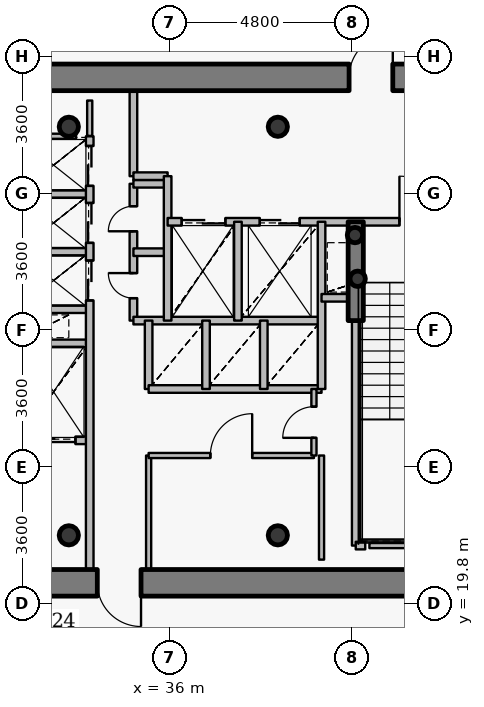
"""IFC4 building model, lengths in metres.
Left out: names, types, materials, properties, quantities, classifications, styles, units other than length and angle.
Written with IfcOpenShell. Run it as: python <this file> out.ifc"""

import sys

from ifc_helpers import new_model, si_unit, direction, frame, frame_2d, origin, origin_2d, place, context, subcontext, project, spatial, rectangle, hollow_circle, extrude, source, transform, mapped, element, fill, save


model = new_model("IFC4")
c1 = context("Model", 3, precision=1e-05, world=origin(), true_north=direction((0.0, 1.0)))
c2 = subcontext(c1, "Body", "Model", "MODEL_VIEW")
j1 = project(units=[si_unit("LENGTHUNIT", "METRE"), si_unit("PLANEANGLEUNIT", "RADIAN")], contexts=[c1])
p1 = place(None, origin())
s1 = spatial("IfcSite", under=j1, at=p1, CompositionType="ELEMENT")
p2 = place(p1, origin())
s2 = spatial("IfcBuilding", under=s1, at=p2, CompositionType="ELEMENT")
p3 = place(p2, frame((0.0, 0.0, 240.3)))
s3 = spatial("IfcBuildingStorey", under=s2, at=p3, CompositionType="ELEMENT", Elevation=240.3)
for number, where, z_axis, x_axis in (
    (1, (33.35, 21.6, 0.0), (0.0, 0.0, 1.0), (1.0, 0.0, 0.0)),
    (2, (38.85, 21.6, 0.0), (0.0, 0.0, 1.0), (1.0, 0.0, 0.0)),
    (3, (38.85, 32.35, 0.0), (0.0, 0.0, 1.0), (1.0, 0.0, 0.0)),
    (4, (33.35, 32.35, 0.0), (0.0, 0.0, 1.0), (1.0, 0.0, 0.0)),
):
    element("IfcColumn", number, at=place(p3, frame(where, z_axis=z_axis, x_axis=x_axis)), inside=s3, PredefinedType="COLUMN", context=c2, shape_type="SweptSolid", body=[
        extrude(hollow_circle(Radius=0.254, WallThickness=0.02, at=origin_2d()), origin(), (0.0, 0.0, 1.0), 3.75),
    ])
for number, where, z_axis, x_axis in (
    (5, (40.95, 28.35, 0.0), (0.0, 0.0, 1.0), (1.0, 0.0, 0.0)),
    (6, (40.88, 29.5, 0.0), (0.0, 0.0, 1.0), (1.0, 0.0, 0.0)),
):
    element("IfcColumn", number, at=place(p3, frame(where, z_axis=z_axis, x_axis=x_axis)), inside=s3, PredefinedType="COLUMN", context=c2, shape_type="SweptSolid", body=[
        extrude(hollow_circle(Radius=0.203, WallThickness=0.016, at=origin_2d()), origin(), (0.0, 0.0, 1.0), 3.75),
    ])
p4 = place(p3, frame((27.05, 33.65, 0.0), z_axis=(0.0, 0.0, 1.0), x_axis=(1.0, 0.0, 0.0)))
e7 = element("IfcWall", 7, at=p4, inside=s3, PredefinedType="SHEAR", context=c2, shape_type="SweptSolid", body=[
    extrude(rectangle(XDim=17.9, YDim=0.7, at=frame_2d((8.95, 0.0))), origin(), (0.0, 0.0, 1.0), 3.05),
])
p5 = place(p4, frame((13.675, 0.0, 0.0)))
e8 = element("IfcOpeningElement", 8, at=p5, cuts=e7, PredefinedType="OPENING", context=c2, shape_type="SweptSolid", body=[
    extrude(rectangle(XDim=1.15, YDim=2.15, at=origin_2d()), frame((0.575, 0.36, 1.075), z_axis=(0.0, -1.0, 0.0), x_axis=(1.0, 0.0, 0.0)), (0.0, 0.0, 1.0), 0.72),
])
p6 = place(p3, frame((44.95, 20.35, 0.0), z_axis=(0.0, 0.0, 1.0), x_axis=(-1.0, 0.0, 0.0)))
e9 = element("IfcWall", 9, at=p6, inside=s3, PredefinedType="SHEAR", context=c2, shape_type="SweptSolid", body=[
    extrude(rectangle(XDim=17.9, YDim=0.7, at=frame_2d((8.95, 0.0))), origin(), (0.0, 0.0, 1.0), 3.05),
])
p7 = place(p6, frame((9.7, 0.0, 0.0)))
e10 = element("IfcOpeningElement", 10, at=p7, cuts=e9, PredefinedType="OPENING", context=c2, shape_type="SweptSolid", body=[
    extrude(rectangle(XDim=1.15, YDim=2.15, at=origin_2d()), frame((0.575, 0.36, 1.075), z_axis=(0.0, -1.0, 0.0), x_axis=(1.0, 0.0, 0.0)), (0.0, 0.0, 1.0), 0.72),
])
p8 = place(p3, frame((40.9, 27.25, 0.0), z_axis=(0.0, 0.0, 1.0), x_axis=(0.0, 1.0, 0.0)))
e11 = element("IfcWall", 11, at=p8, inside=s3, PredefinedType="SHEAR", context=c2, shape_type="SweptSolid", body=[
    extrude(rectangle(XDim=2.6, YDim=0.4, at=frame_2d((1.3, 0.0))), origin(), (0.0, 0.0, 1.0), 3.1),
])
p9 = place(p3, frame((32.0, 24.1, 0.0), z_axis=(0.0, 0.0, 1.0), x_axis=(1.0, 0.0, 0.0)))
e12 = element("IfcWall", 12, at=p9, inside=s3, PredefinedType="PARTITIONING", context=c2, shape_type="SweptSolid", body=[
    extrude(rectangle(XDim=1.9, YDim=0.2, at=frame_2d((0.95, 0.0))), origin(), (0.0, 0.0, 1.0), 3.085),
])
p10 = place(p9, frame((0.375, 0.0, 0.0)))
e13 = element("IfcOpeningElement", 13, at=p10, cuts=e12, PredefinedType="OPENING", context=c2, shape_type="SweptSolid", body=[
    extrude(rectangle(XDim=1.15, YDim=2.15, at=origin_2d()), frame((0.575, 0.11, 1.075), z_axis=(0.0, -1.0, 0.0), x_axis=(1.0, 0.0, 0.0)), (0.0, 0.0, 1.0), 0.22),
])
for number, where, z_axis, x_axis in (
    (14, (32.0, 26.65, 0.0), (0.0, 0.0, 1.0), (1.0, 0.0, 0.0)),
    (15, (32.0, 27.55, 0.0), (0.0, 0.0, 1.0), (1.0, 0.0, 0.0)),
    (16, (32.0, 29.06, 0.0), (0.0, 0.0, 1.0), (1.0, 0.0, 0.0)),
    (17, (32.0, 30.58, 0.0), (0.0, 0.0, 1.0), (1.0, 0.0, 0.0)),
):
    element("IfcWall", number, at=place(p3, frame(where, z_axis=z_axis, x_axis=x_axis)), inside=s3, PredefinedType="PARTITIONING", context=c2, shape_type="SweptSolid", body=[
        extrude(rectangle(XDim=1.9, YDim=0.2, at=frame_2d((0.95, 0.0))), origin(), (0.0, 0.0, 1.0), 3.085),
    ])
p11 = place(p3, frame((33.9, 20.7, 0.0), z_axis=(0.0, 0.0, 1.0), x_axis=(0.0, 1.0, 0.0)))
e18 = element("IfcWall", 18, at=p11, inside=s3, PredefinedType="PARTITIONING", context=c2, shape_type="SweptSolid", body=[
    extrude(rectangle(XDim=11.4, YDim=0.2, at=frame_2d((5.7, 0.0))), origin(), (0.0, 0.0, 1.0), 3.085),
])
p12 = place(p11, frame((7.08, 0.0, 0.0)))
e19 = element("IfcOpeningElement", 19, at=p12, cuts=e18, PredefinedType="OPENING", context=c2, shape_type="SweptSolid", body=[
    extrude(rectangle(XDim=1.05, YDim=2.15, at=origin_2d()), frame((0.525, 0.11, 1.075), z_axis=(0.0, -1.0, 0.0), x_axis=(1.0, 0.0, 0.0)), (0.0, 0.0, 1.0), 0.22),
])
p13 = place(p11, frame((8.595, 0.0, 0.0)))
e20 = element("IfcOpeningElement", 20, at=p13, cuts=e18, PredefinedType="OPENING", context=c2, shape_type="SweptSolid", body=[
    extrude(rectangle(XDim=1.05, YDim=2.15, at=origin_2d()), frame((0.525, 0.11, 1.075), z_axis=(0.0, -1.0, 0.0), x_axis=(1.0, 0.0, 0.0)), (0.0, 0.0, 1.0), 0.22),
])
p14 = place(p11, frame((10.095, 0.0, 0.0)))
e21 = element("IfcOpeningElement", 21, at=p14, cuts=e18, PredefinedType="OPENING", context=c2, shape_type="SweptSolid", body=[
    extrude(rectangle(XDim=1.05, YDim=2.15, at=origin_2d()), frame((0.525, 0.11, 1.075), z_axis=(0.0, -1.0, 0.0), x_axis=(1.0, 0.0, 0.0)), (0.0, 0.0, 1.0), 0.22),
])
p15 = place(p3, frame((35.05, 27.25, 0.0), z_axis=(0.0, 0.0, 1.0), x_axis=(0.0, 1.0, 0.0)))
e22 = element("IfcWall", 22, at=p15, inside=s3, PredefinedType="PARTITIONING", context=c2, shape_type="SweptSolid", body=[
    extrude(rectangle(XDim=3.6, YDim=0.2, at=frame_2d((1.8, 0.0))), origin(), (0.0, 0.0, 1.0), 3.5),
])
p16 = place(p15, frame((0.59, 0.0, 0.0)))
e23 = element("IfcOpeningElement", 23, at=p16, cuts=e22, PredefinedType="OPENING", context=c2, shape_type="SweptSolid", body=[
    extrude(rectangle(XDim=0.66, YDim=2.05, at=origin_2d()), frame((0.33, 0.11, 1.025), z_axis=(0.0, -1.0, 0.0), x_axis=(1.0, 0.0, 0.0)), (0.0, 0.0, 1.0), 0.22),
])
p17 = place(p15, frame((2.35, 0.0, 0.0)))
e24 = element("IfcOpeningElement", 24, at=p17, cuts=e22, PredefinedType="OPENING", context=c2, shape_type="SweptSolid", body=[
    extrude(rectangle(XDim=0.66, YDim=2.05, at=origin_2d()), frame((0.33, 0.11, 1.025), z_axis=(0.0, -1.0, 0.0), x_axis=(1.0, 0.0, 0.0)), (0.0, 0.0, 1.0), 0.22),
])
p18 = place(p3, frame((35.05, 27.25, 0.0), z_axis=(0.0, 0.0, 1.0), x_axis=(1.0, 0.0, 0.0)))
e25 = element("IfcWall", 25, at=p18, inside=s3, PredefinedType="PARTITIONING", context=c2, shape_type="SweptSolid", body=[
    extrude(rectangle(XDim=4.95, YDim=0.2, at=frame_2d((2.475, 0.0))), origin(), (0.0, 0.0, 1.0), 3.085),
])
for number, where, z_axis, x_axis in (
    (26, (35.05, 29.05, 0.0), (0.0, 0.0, 1.0), (1.0, 0.0, 0.0)),
    (27, (35.05, 30.85, 0.0), (0.0, 0.0, 1.0), (1.0, 0.0, 0.0)),
):
    element("IfcWall", number, at=place(p3, frame(where, z_axis=z_axis, x_axis=x_axis)), inside=s3, PredefinedType="PARTITIONING", context=c2, shape_type="SweptSolid", body=[
        extrude(rectangle(XDim=0.9, YDim=0.2, at=frame_2d((0.45, 0.0))), origin(), (0.0, 0.0, 1.0), 3.5),
    ])
p19 = place(p3, frame((35.05, 31.05, 0.0), z_axis=(0.0, 0.0, 1.0), x_axis=(0.0, 1.0, 0.0)))
e28 = element("IfcWall", 28, at=p19, inside=s3, PredefinedType="PARTITIONING", context=c2, shape_type="SweptSolid", body=[
    extrude(rectangle(XDim=2.25, YDim=0.2, at=frame_2d((1.125, 0.0))), origin(), (0.0, 0.0, 1.0), 3.085),
])
p20 = place(p3, frame((35.05, 31.05, 0.0), z_axis=(0.0, 0.0, 1.0), x_axis=(1.0, 0.0, 0.0)))
e29 = element("IfcWall", 29, at=p20, inside=s3, PredefinedType="PARTITIONING", context=c2, shape_type="SweptSolid", body=[
    extrude(rectangle(XDim=0.9, YDim=0.2, at=frame_2d((0.45, 0.0))), origin(), (0.0, 0.0, 1.0), 3.5),
])
p21 = place(p3, frame((35.45, 20.7, 0.0), z_axis=(0.0, 0.0, 1.0), x_axis=(0.0, 1.0, 0.0)))
e30 = element("IfcWall", 30, at=p21, inside=s3, PredefinedType="PARTITIONING", context=c2, shape_type="SweptSolid", body=[
    extrude(rectangle(XDim=3.0, YDim=0.135, at=frame_2d((1.5, 0.0))), origin(), (0.0, 0.0, 1.0), 3.085),
])
p22 = place(p3, frame((35.45, 23.7, 0.0), z_axis=(0.0, 0.0, 1.0), x_axis=(1.0, 0.0, 0.0)))
e31 = element("IfcWall", 31, at=p22, inside=s3, PredefinedType="PARTITIONING", context=c2, shape_type="SweptSolid", body=[
    extrude(rectangle(XDim=4.35, YDim=0.135, at=frame_2d((2.175, 0.0))), origin(), (0.0, 0.0, 1.0), 3.085),
])
p23 = place(p22, frame((1.625, 0.0, 0.0)))
e32 = element("IfcOpeningElement", 32, at=p23, cuts=e31, PredefinedType="OPENING", context=c2, shape_type="SweptSolid", body=[
    extrude(rectangle(XDim=1.1, YDim=2.15, at=origin_2d()), frame((0.55, 0.078, 1.075), z_axis=(0.0, -1.0, 0.0), x_axis=(1.0, 0.0, 0.0)), (0.0, 0.0, 1.0), 0.155),
])
p24 = place(p3, frame((35.45, 25.45, 0.0), z_axis=(0.0, 0.0, 1.0), x_axis=(0.0, 1.0, 0.0)))
e33 = element("IfcWall", 33, at=p24, inside=s3, PredefinedType="PARTITIONING", context=c2, shape_type="SweptSolid", body=[
    extrude(rectangle(XDim=1.8, YDim=0.2, at=frame_2d((0.9, 0.0))), origin(), (0.0, 0.0, 1.0), 3.5),
])
p25 = place(p3, frame((35.45, 25.45, 0.0), z_axis=(0.0, 0.0, 1.0), x_axis=(1.0, 0.0, 0.0)))
e34 = element("IfcWall", 34, at=p25, inside=s3, PredefinedType="PARTITIONING", context=c2, shape_type="SweptSolid", body=[
    extrude(rectangle(XDim=4.55, YDim=0.2, at=frame_2d((2.275, 0.0))), origin(), (0.0, 0.0, 1.0), 3.085),
])
p26 = place(p3, frame((35.95, 27.25, 0.0), z_axis=(0.0, 0.0, 1.0), x_axis=(0.0, 1.0, 0.0)))
e35 = element("IfcWall", 35, at=p26, inside=s3, PredefinedType="PARTITIONING", context=c2, shape_type="SweptSolid", body=[
    extrude(rectangle(XDim=3.8, YDim=0.2, at=frame_2d((1.9, 0.0))), origin(), (0.0, 0.0, 1.0), 3.5),
])
p27 = place(p3, frame((35.95, 29.85, 0.0), z_axis=(0.0, 0.0, 1.0), x_axis=(1.0, 0.0, 0.0)))
e36 = element("IfcWall", 36, at=p27, inside=s3, PredefinedType="PARTITIONING", context=c2, shape_type="SweptSolid", body=[
    extrude(rectangle(XDim=8.49, YDim=0.2, at=frame_2d((4.245, 0.0))), origin(), (0.0, 0.0, 1.0), 3.085),
])
p28 = place(p27, frame((6.1, 0.0, 0.0)))
e37 = element("IfcOpeningElement", 37, at=p28, cuts=e36, PredefinedType="OPENING", context=c2, shape_type="SweptSolid", body=[
    extrude(rectangle(XDim=1.2, YDim=2.15, at=origin_2d()), frame((0.6, 0.11, 1.075), z_axis=(0.0, -1.0, 0.0), x_axis=(1.0, 0.0, 0.0)), (0.0, 0.0, 1.0), 0.22),
])
p29 = place(p27, frame((0.37, 0.0, 0.0)))
e38 = element("IfcOpeningElement", 38, at=p29, cuts=e36, PredefinedType="OPENING", context=c2, shape_type="SweptSolid", body=[
    extrude(rectangle(XDim=1.15, YDim=2.15, at=origin_2d()), frame((0.575, 0.11, 1.075), z_axis=(0.0, -1.0, 0.0), x_axis=(1.0, 0.0, 0.0)), (0.0, 0.0, 1.0), 0.22),
])
p30 = place(p27, frame((2.425, 0.0, 0.0)))
e39 = element("IfcOpeningElement", 39, at=p30, cuts=e36, PredefinedType="OPENING", context=c2, shape_type="SweptSolid", body=[
    extrude(rectangle(XDim=1.05, YDim=2.15, at=origin_2d()), frame((0.525, 0.11, 1.075), z_axis=(0.0, -1.0, 0.0), x_axis=(1.0, 0.0, 0.0)), (0.0, 0.0, 1.0), 0.22),
])
p31 = place(p3, frame((36.96, 25.45, 0.0), z_axis=(0.0, 0.0, 1.0), x_axis=(0.0, 1.0, 0.0)))
e40 = element("IfcWall", 40, at=p31, inside=s3, PredefinedType="PARTITIONING", context=c2, shape_type="SweptSolid", body=[
    extrude(rectangle(XDim=1.8, YDim=0.2, at=frame_2d((0.9, 0.0))), origin(), (0.0, 0.0, 1.0), 3.5),
])
p32 = place(p3, frame((37.8, 27.25, 0.0), z_axis=(0.0, 0.0, 1.0), x_axis=(0.0, 1.0, 0.0)))
e41 = element("IfcWall", 41, at=p32, inside=s3, PredefinedType="PARTITIONING", context=c2, shape_type="SweptSolid", body=[
    extrude(rectangle(XDim=2.6, YDim=0.2, at=frame_2d((1.3, 0.0))), origin(), (0.0, 0.0, 1.0), 3.5),
])
p33 = place(p3, frame((38.48, 25.45, 0.0), z_axis=(0.0, 0.0, 1.0), x_axis=(0.0, 1.0, 0.0)))
e42 = element("IfcWall", 42, at=p33, inside=s3, PredefinedType="PARTITIONING", context=c2, shape_type="SweptSolid", body=[
    extrude(rectangle(XDim=1.8, YDim=0.2, at=frame_2d((0.9, 0.0))), origin(), (0.0, 0.0, 1.0), 3.5),
])
p34 = place(p3, frame((39.8, 23.7, 0.0), z_axis=(0.0, 0.0, 1.0), x_axis=(0.0, 1.0, 0.0)))
e43 = element("IfcWall", 43, at=p34, inside=s3, PredefinedType="PARTITIONING", context=c2, shape_type="SweptSolid", body=[
    extrude(rectangle(XDim=1.75, YDim=0.135, at=frame_2d((0.875, 0.0))), origin(), (0.0, 0.0, 1.0), 3.5),
])
p35 = place(p34, frame((0.465, 0.0, 0.0)))
e44 = element("IfcOpeningElement", 44, at=p35, cuts=e43, PredefinedType="OPENING", context=c2, shape_type="SweptSolid", body=[
    extrude(rectangle(XDim=0.82, YDim=2.1, at=origin_2d()), frame((0.41, 0.078, 1.05), z_axis=(0.0, -1.0, 0.0), x_axis=(1.0, 0.0, 0.0)), (0.0, 0.0, 1.0), 0.155),
])
p36 = place(p3, frame((40.0, 25.45, 0.0), z_axis=(0.0, 0.0, 1.0), x_axis=(0.0, 1.0, 0.0)))
e45 = element("IfcWall", 45, at=p36, inside=s3, PredefinedType="PARTITIONING", context=c2, shape_type="SweptSolid", body=[
    extrude(rectangle(XDim=4.4, YDim=0.2, at=frame_2d((2.2, 0.0))), origin(), (0.0, 0.0, 1.0), 3.5),
])
p37 = place(p3, frame((40.0, 27.85, 0.0), z_axis=(0.0, 0.0, 1.0), x_axis=(1.0, 0.0, 0.0)))
e46 = element("IfcWall", 46, at=p37, inside=s3, PredefinedType="PARTITIONING", context=c2, shape_type="SweptSolid", body=[
    extrude(rectangle(XDim=0.9, YDim=0.2, at=frame_2d((0.45, 0.0))), origin(), (0.0, 0.0, 1.0), 3.5),
])
p38 = place(p3, frame((40.9, 21.33, 0.0), z_axis=(0.0, 0.0, 1.0), x_axis=(0.0, 1.0, 0.0)))
e47 = element("IfcWall", 47, at=p38, inside=s3, PredefinedType="PARTITIONING", context=c2, shape_type="SweptSolid", body=[
    extrude(rectangle(XDim=5.91, YDim=0.2, at=frame_2d((2.955, 0.0))), origin(), (0.0, 0.0, 1.0), 3.035),
])
p39 = place(p3, frame((40.9, 21.33, 0.0), z_axis=(0.0, 0.0, 1.0), x_axis=(1.0, 0.0, 0.0)))
e48 = element("IfcWall", 48, at=p39, inside=s3, PredefinedType="PARTITIONING", context=c2, shape_type="SweptSolid", body=[
    extrude(rectangle(XDim=0.25, YDim=0.2, at=frame_2d((0.125, 0.0))), origin(), (0.0, 0.0, 1.0), 3.035),
])
p40 = place(p3, frame((44.08, 21.33, 0.0), z_axis=(0.0, 0.0, 1.0), x_axis=(-1.0, 0.0, 0.0)))
e49 = element("IfcWall", 49, at=p40, inside=s3, PredefinedType="PARTITIONING", context=c2, shape_type="SweptSolid", body=[
    extrude(rectangle(XDim=2.82, YDim=0.135, at=frame_2d((1.41, 0.0))), origin(), (0.0, 0.0, 1.0), 3.035),
])
p41 = place(p3, frame((32.36, 32.1, 0.0), z_axis=(0.0, 0.0, 1.0), x_axis=(1.0, 0.0, 0.0)))
e50 = element("IfcWall", 50, at=p41, inside=s3, PredefinedType="PARTITIONING", context=c2, shape_type="SweptSolid", body=[
    extrude(rectangle(XDim=1.18, YDim=0.135, at=frame_2d((0.59, 0.0))), origin(), (0.0, 0.0, 1.0), 3.085),
])
p42 = place(p3, frame((40.0, 23.7, 0.0), z_axis=(0.0, 0.0, 1.0), x_axis=(0.0, -1.0, 0.0)))
e51 = element("IfcWall", 51, at=p42, inside=s3, PredefinedType="PARTITIONING", context=c2, shape_type="SweptSolid", body=[
    extrude(rectangle(XDim=2.74, YDim=0.135, at=frame_2d((1.37, 0.0))), origin(), (0.0, 0.0, 1.0), 3.035),
])
p43 = place(p3, frame((33.9, 32.11, 0.0), z_axis=(0.0, 0.0, 1.0), x_axis=(0.0, 1.0, 0.0)))
e52 = element("IfcWall", 52, at=p43, inside=s3, PredefinedType="PARTITIONING", context=c2, shape_type="SweptSolid", body=[
    extrude(rectangle(XDim=0.93, YDim=0.135, at=frame_2d((0.465, 0.0))), origin(), (0.0, 0.0, 1.0), 3.085),
])
m1 = source(origin(), c2, "Body", "SweptSolid", [
    extrude(rectangle(XDim=1.15, YDim=2.15, at=origin_2d()), frame((0.575, 0.025, 1.075), z_axis=(0.0, -1.0, 0.0), x_axis=(1.0, 0.0, 0.0)), (0.0, 0.0, 1.0), 0.05),
])
p44 = place(p5, origin())
e53 = element("IfcDoor", 53, at=p44, inside=s3, OperationType="SINGLE_SWING_RIGHT", PredefinedType="DOOR", context=c2, shape_type="MappedRepresentation", body=[
    mapped(m1, transform((0.0, 0.0, 0.0), x_axis=(1.0, 0.0, 0.0), y_axis=(0.0, 1.0, 0.0), z_axis=(0.0, 0.0, 1.0), scale=1.0)),
])
fill(e8, e53)
p45 = place(p7, origin())
e54 = element("IfcDoor", 54, at=p45, inside=s3, OperationType="SINGLE_SWING_LEFT", PredefinedType="DOOR", context=c2, shape_type="MappedRepresentation", body=[
    mapped(m1, transform((0.0, 0.0, 0.0), x_axis=(1.0, 0.0, 0.0), y_axis=(0.0, 1.0, 0.0), z_axis=(0.0, 0.0, 1.0), scale=1.0)),
])
fill(e10, e54)
m2 = source(origin(), c2, "Body", "SweptSolid", [
    extrude(rectangle(XDim=1.2, YDim=2.15, at=origin_2d()), frame((0.6, 0.025, 1.075), z_axis=(0.0, -1.0, 0.0), x_axis=(1.0, 0.0, 0.0)), (0.0, 0.0, 1.0), 0.05),
])
p46 = place(p28, origin())
e55 = element("IfcDoor", 55, at=p46, inside=s3, OperationType="SINGLE_SWING_LEFT", PredefinedType="DOOR", context=c2, shape_type="MappedRepresentation", body=[
    mapped(m2, transform((0.0, 0.0, 0.0), x_axis=(1.0, 0.0, 0.0), y_axis=(0.0, 1.0, 0.0), z_axis=(0.0, 0.0, 1.0), scale=1.0)),
])
fill(e37, e55)
m3 = source(origin(), c2, "Body", "SweptSolid", [
    extrude(rectangle(XDim=1.15, YDim=2.15, at=origin_2d()), frame((0.575, 0.025, 1.075), z_axis=(0.0, -1.0, 0.0), x_axis=(1.0, 0.0, 0.0)), (0.0, 0.0, 1.0), 0.05),
])
p47 = place(p29, origin())
e56 = element("IfcDoor", 56, at=p47, inside=s3, OperationType="DOUBLE_DOOR_SLIDING", PredefinedType="USERDEFINED", context=c2, shape_type="MappedRepresentation", body=[
    mapped(m3, transform((0.0, 0.0, 0.0), x_axis=(1.0, 0.0, 0.0), y_axis=(0.0, 1.0, 0.0), z_axis=(0.0, 0.0, 1.0), scale=1.0)),
])
fill(e38, e56)
p48 = place(p10, origin())
e57 = element("IfcDoor", 57, at=p48, inside=s3, OperationType="DOUBLE_DOOR_SLIDING", PredefinedType="USERDEFINED", context=c2, shape_type="MappedRepresentation", body=[
    mapped(m3, transform((0.0, 0.0, 0.0), x_axis=(1.0, 0.0, 0.0), y_axis=(0.0, 1.0, 0.0), z_axis=(0.0, 0.0, 1.0), scale=1.0)),
])
fill(e13, e57)
m4 = source(origin(), c2, "Body", "SweptSolid", [
    extrude(rectangle(XDim=1.05, YDim=2.15, at=origin_2d()), frame((0.525, 0.025, 1.075), z_axis=(0.0, -1.0, 0.0), x_axis=(1.0, 0.0, 0.0)), (0.0, 0.0, 1.0), 0.05),
])
p49 = place(p30, origin())
e58 = element("IfcDoor", 58, at=p49, inside=s3, OperationType="DOUBLE_DOOR_SLIDING", PredefinedType="USERDEFINED", context=c2, shape_type="MappedRepresentation", body=[
    mapped(m4, transform((0.0, 0.0, 0.0), x_axis=(1.0, 0.0, 0.0), y_axis=(0.0, 1.0, 0.0), z_axis=(0.0, 0.0, 1.0), scale=1.0)),
])
fill(e39, e58)
p50 = place(p12, origin())
e59 = element("IfcDoor", 59, at=p50, inside=s3, OperationType="DOUBLE_DOOR_SLIDING", PredefinedType="USERDEFINED", context=c2, shape_type="MappedRepresentation", body=[
    mapped(m4, transform((0.0, 0.0, 0.0), x_axis=(1.0, 0.0, 0.0), y_axis=(0.0, 1.0, 0.0), z_axis=(0.0, 0.0, 1.0), scale=1.0)),
])
fill(e19, e59)
p51 = place(p13, origin())
e60 = element("IfcDoor", 60, at=p51, inside=s3, OperationType="DOUBLE_DOOR_SLIDING", PredefinedType="USERDEFINED", context=c2, shape_type="MappedRepresentation", body=[
    mapped(m4, transform((0.0, 0.0, 0.0), x_axis=(1.0, 0.0, 0.0), y_axis=(0.0, 1.0, 0.0), z_axis=(0.0, 0.0, 1.0), scale=1.0)),
])
fill(e20, e60)
p52 = place(p14, origin())
e61 = element("IfcDoor", 61, at=p52, inside=s3, OperationType="DOUBLE_DOOR_SLIDING", PredefinedType="USERDEFINED", context=c2, shape_type="MappedRepresentation", body=[
    mapped(m4, transform((0.0, 0.0, 0.0), x_axis=(1.0, 0.0, 0.0), y_axis=(0.0, 1.0, 0.0), z_axis=(0.0, 0.0, 1.0), scale=1.0)),
])
fill(e21, e61)
m5 = source(origin(), c2, "Body", "SweptSolid", [
    extrude(rectangle(XDim=0.66, YDim=2.05, at=origin_2d()), frame((0.33, 0.025, 1.025), z_axis=(0.0, -1.0, 0.0), x_axis=(1.0, 0.0, 0.0)), (0.0, 0.0, 1.0), 0.05),
])
p53 = place(p16, origin())
e62 = element("IfcDoor", 62, at=p53, inside=s3, OperationType="SINGLE_SWING_RIGHT", PredefinedType="USERDEFINED", context=c2, shape_type="MappedRepresentation", body=[
    mapped(m5, transform((0.0, 0.0, 0.0), x_axis=(1.0, 0.0, 0.0), y_axis=(0.0, 1.0, 0.0), z_axis=(0.0, 0.0, 1.0), scale=1.0)),
])
fill(e23, e62)
p54 = place(p17, origin())
e63 = element("IfcDoor", 63, at=p54, inside=s3, OperationType="SINGLE_SWING_LEFT", PredefinedType="USERDEFINED", context=c2, shape_type="MappedRepresentation", body=[
    mapped(m5, transform((0.0, 0.0, 0.0), x_axis=(1.0, 0.0, 0.0), y_axis=(0.0, 1.0, 0.0), z_axis=(0.0, 0.0, 1.0), scale=1.0)),
])
fill(e24, e63)
m6 = source(origin(), c2, "Body", "SweptSolid", [
    extrude(rectangle(XDim=1.1, YDim=2.15, at=origin_2d()), frame((0.55, 0.025, 1.075), z_axis=(0.0, -1.0, 0.0), x_axis=(1.0, 0.0, 0.0)), (0.0, 0.0, 1.0), 0.05),
])
p55 = place(p23, origin())
e64 = element("IfcDoor", 64, at=p55, inside=s3, OperationType="SINGLE_SWING_RIGHT", PredefinedType="DOOR", context=c2, shape_type="MappedRepresentation", body=[
    mapped(m6, transform((0.0, 0.0, 0.0), x_axis=(1.0, 0.0, 0.0), y_axis=(0.0, 1.0, 0.0), z_axis=(0.0, 0.0, 1.0), scale=1.0)),
])
fill(e32, e64)
m7 = source(origin(), c2, "Body", "SweptSolid", [
    extrude(rectangle(XDim=0.82, YDim=2.1, at=origin_2d()), frame((0.41, 0.025, 1.05), z_axis=(0.0, -1.0, 0.0), x_axis=(1.0, 0.0, 0.0)), (0.0, 0.0, 1.0), 0.05),
])
p56 = place(p35, origin())
e65 = element("IfcDoor", 65, at=p56, inside=s3, OperationType="SINGLE_SWING_LEFT", PredefinedType="DOOR", context=c2, shape_type="MappedRepresentation", body=[
    mapped(m7, transform((0.0, 0.0, 0.0), x_axis=(1.0, 0.0, 0.0), y_axis=(0.0, 1.0, 0.0), z_axis=(0.0, 0.0, 1.0), scale=1.0)),
])
fill(e44, e65)
save(model, sys.argv[1])
